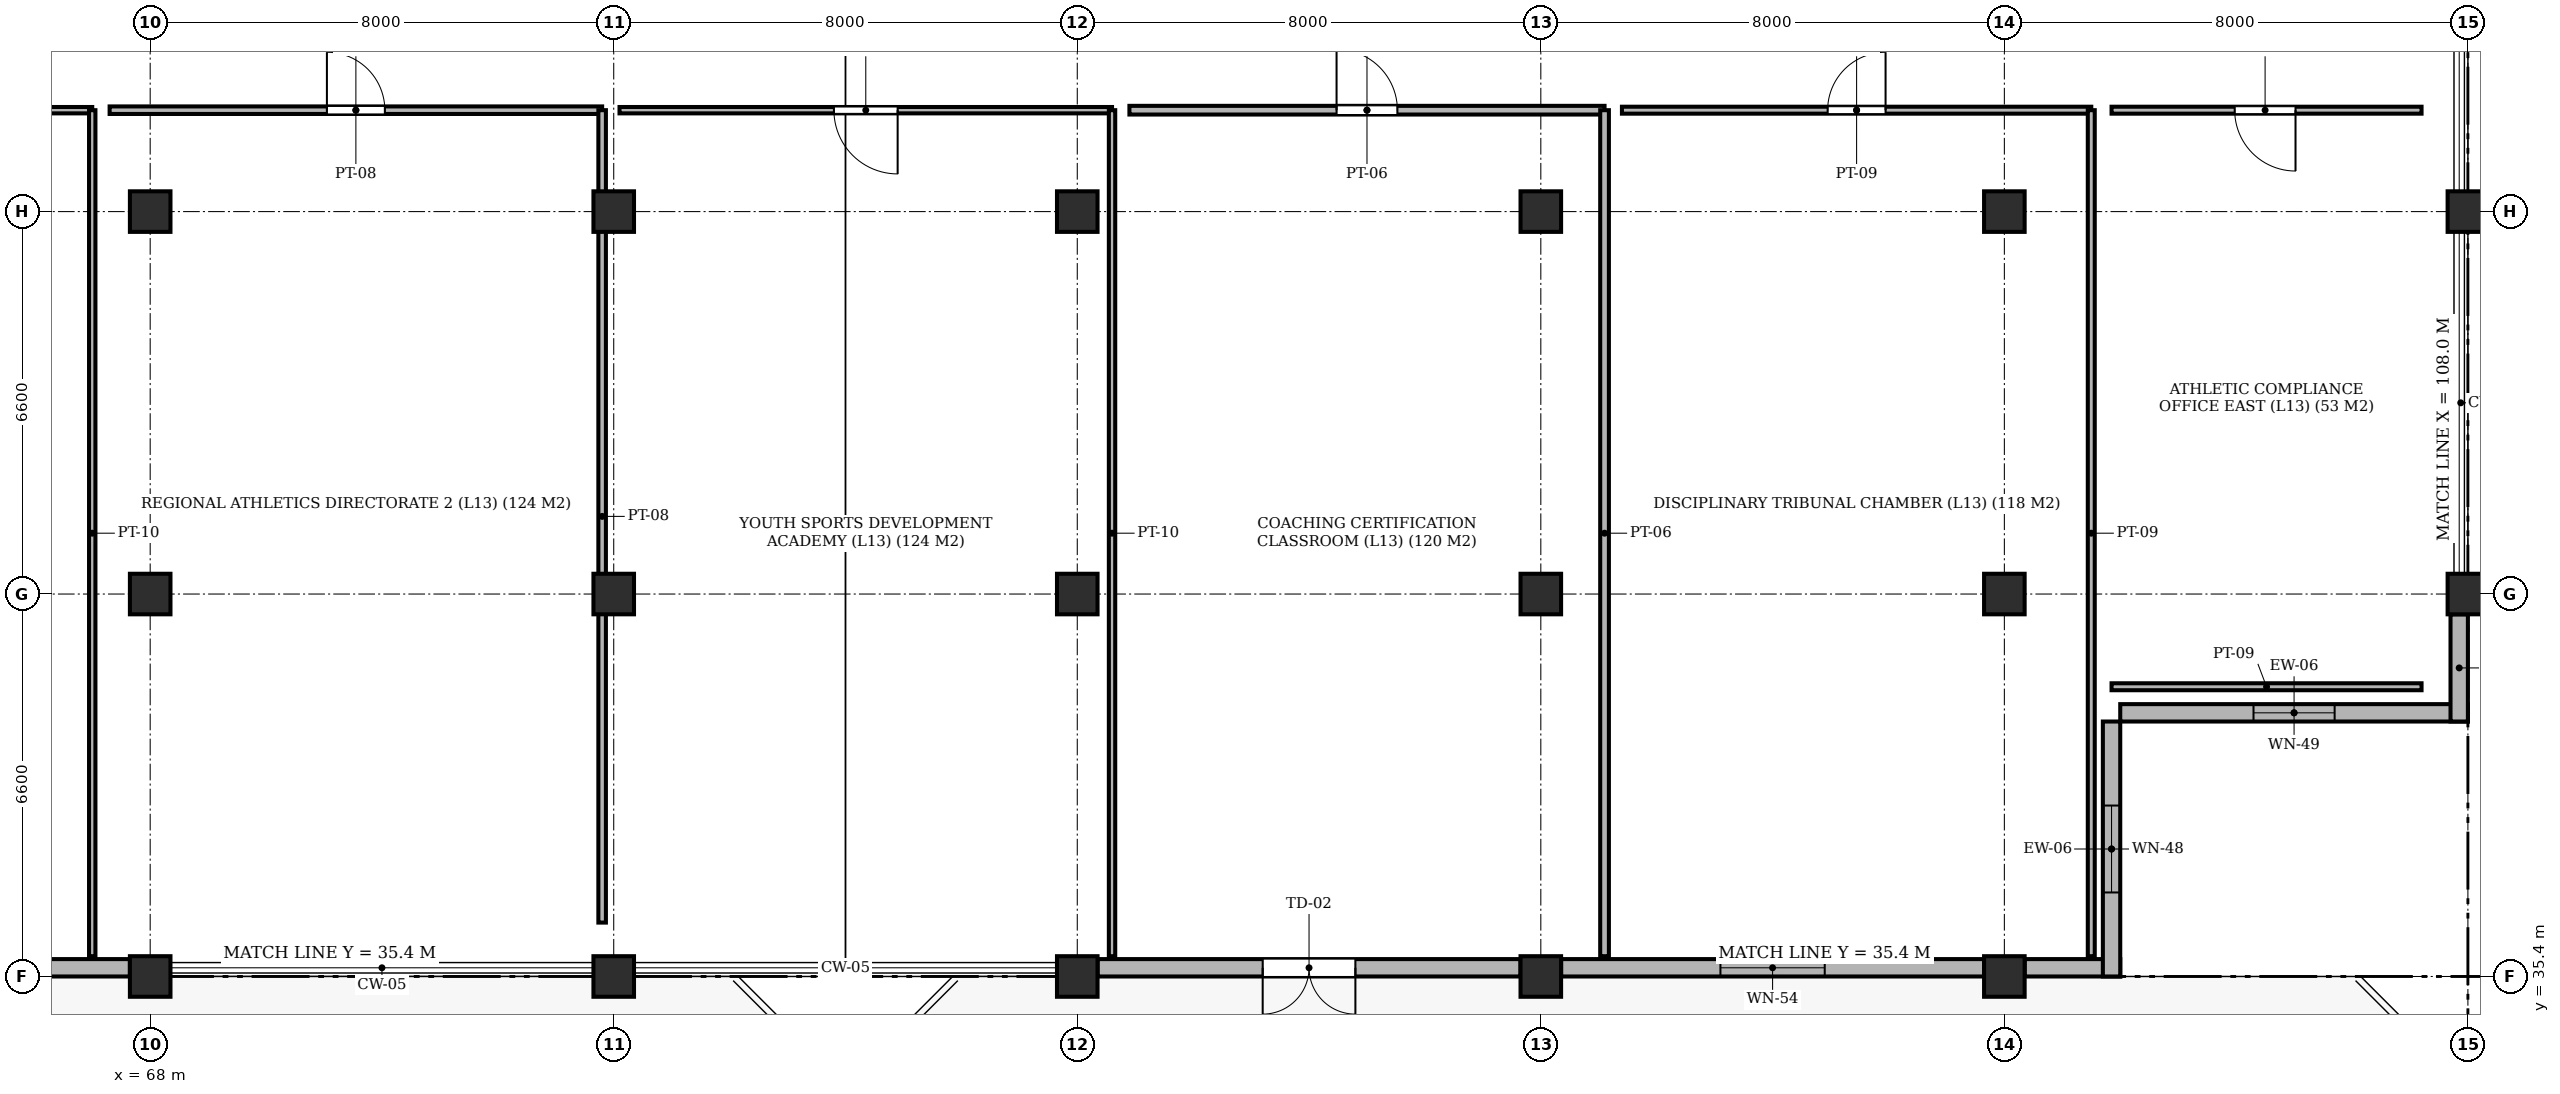
"""IFC4 building model, lengths in metres.
Left out: names, types, materials, properties, quantities, classifications, styles, units other than length and angle.
Written with IfcOpenShell. Run it as: python <this file> out.ifc"""

import sys

from ifc_helpers import new_model, si_unit, direction, frame, frame_2d, origin, origin_2d, place, context, subcontext, project, spatial, rectangle, extrude, element, fill, save


model = new_model("IFC4")
c1 = context("Model", 3, precision=1e-05, world=origin(), true_north=direction((0.0, 1.0)))
c2 = subcontext(c1, "Body", "Model", "MODEL_VIEW")
j1 = project(units=[si_unit("LENGTHUNIT", "METRE"), si_unit("PLANEANGLEUNIT", "RADIAN")], contexts=[c1])
p1 = place(None, origin())
s1 = spatial("IfcSite", under=j1, at=p1, CompositionType="ELEMENT")
p2 = place(p1, origin())
s2 = spatial("IfcBuilding", under=s1, at=p2, CompositionType="ELEMENT")
p3 = place(p2, frame((0.0, 0.0, 53.55)))
s3 = spatial("IfcBuildingStorey", under=s2, at=p3, CompositionType="ELEMENT", Elevation=53.55)
for number, where, z_axis, x_axis in (
    (1, (68.0, 35.4, -0.22), (0.0, 0.0, 1.0), (1.0, 0.0, 0.0)),
    (2, (68.0, 42.0, -0.22), (0.0, 0.0, 1.0), (1.0, 0.0, 0.0)),
    (3, (68.0, 48.6, -0.22), (0.0, 0.0, 1.0), (1.0, 0.0, 0.0)),
    (4, (76.0, 35.4, -0.22), (0.0, 0.0, 1.0), (1.0, 0.0, 0.0)),
    (5, (76.0, 42.0, -0.22), (0.0, 0.0, 1.0), (1.0, 0.0, 0.0)),
    (6, (76.0, 48.6, -0.22), (0.0, 0.0, 1.0), (1.0, 0.0, 0.0)),
    (7, (84.0, 35.4, -0.22), (0.0, 0.0, 1.0), (1.0, 0.0, 0.0)),
    (8, (84.0, 42.0, -0.22), (0.0, 0.0, 1.0), (1.0, 0.0, 0.0)),
    (9, (84.0, 48.6, -0.22), (0.0, 0.0, 1.0), (1.0, 0.0, 0.0)),
    (10, (92.0, 35.4, -0.22), (0.0, 0.0, 1.0), (1.0, 0.0, 0.0)),
    (11, (92.0, 42.0, -0.22), (0.0, 0.0, 1.0), (1.0, 0.0, 0.0)),
    (12, (92.0, 48.6, -0.22), (0.0, 0.0, 1.0), (1.0, 0.0, 0.0)),
    (13, (100.0, 35.4, -0.22), (0.0, 0.0, 1.0), (1.0, 0.0, 0.0)),
    (14, (100.0, 42.0, -0.22), (0.0, 0.0, 1.0), (1.0, 0.0, 0.0)),
    (15, (100.0, 48.6, -0.22), (0.0, 0.0, 1.0), (1.0, 0.0, 0.0)),
    (16, (108.0, 42.0, -0.22), (0.0, 0.0, 1.0), (1.0, 0.0, 0.0)),
    (17, (108.0, 48.6, -0.22), (0.0, 0.0, 1.0), (1.0, 0.0, 0.0)),
):
    element("IfcColumn", number, at=place(p3, frame(where, z_axis=z_axis, x_axis=x_axis)), inside=s3, PredefinedType="COLUMN", context=c2, shape_type="SweptSolid", body=[
        extrude(rectangle(XDim=0.7, YDim=0.7, at=origin_2d()), origin(), (0.0, 0.0, 1.0), 3.25),
    ])
p4 = place(p3, frame((60.35, 35.55, 0.0), z_axis=(0.0, 0.0, 1.0), x_axis=(1.0, 0.0, 0.0)))
e18 = element("IfcWall", 18, at=p4, inside=s3, PredefinedType="SOLIDWALL", context=c2, shape_type="SweptSolid", body=[
    extrude(rectangle(XDim=7.3, YDim=0.3, at=frame_2d((3.65, 0.0))), origin(), (0.0, 0.0, 1.0), 2.53),
])
p5 = place(p4, frame((2.85, 0.0, 0.0)))
e19 = element("IfcOpeningElement", 19, at=p5, cuts=e18, PredefinedType="OPENING", context=c2, shape_type="SweptSolid", body=[
    extrude(rectangle(XDim=1.6, YDim=2.2, at=frame_2d((0.8, 1.1))), frame((0.0, 0.162, 0.0), z_axis=(0.0, -1.0, 0.0), x_axis=(1.0, 0.0, 0.0)), (0.0, 0.0, 1.0), 0.324),
])
p6 = place(p3, frame((84.35, 35.55, 0.0), z_axis=(0.0, 0.0, 1.0), x_axis=(1.0, 0.0, 0.0)))
e20 = element("IfcWall", 20, at=p6, inside=s3, PredefinedType="SOLIDWALL", context=c2, shape_type="SweptSolid", body=[
    extrude(rectangle(XDim=7.3, YDim=0.3, at=frame_2d((3.65, 0.0))), origin(), (0.0, 0.0, 1.0), 2.53),
])
p7 = place(p6, frame((2.85, 0.0, 0.0)))
e21 = element("IfcOpeningElement", 21, at=p7, cuts=e20, PredefinedType="OPENING", context=c2, shape_type="SweptSolid", body=[
    extrude(rectangle(XDim=1.6, YDim=2.2, at=frame_2d((0.8, 1.1))), frame((0.0, 0.162, 0.0), z_axis=(0.0, -1.0, 0.0), x_axis=(1.0, 0.0, 0.0)), (0.0, 0.0, 1.0), 0.324),
])
p8 = place(p3, frame((92.35, 35.55, 0.0), z_axis=(0.0, 0.0, 1.0), x_axis=(1.0, 0.0, 0.0)))
e22 = element("IfcWall", 22, at=p8, inside=s3, PredefinedType="SOLIDWALL", context=c2, shape_type="SweptSolid", body=[
    extrude(rectangle(XDim=7.3, YDim=0.3, at=frame_2d((3.65, 0.0))), origin(), (0.0, 0.0, 1.0), 2.53),
])
p9 = place(p8, frame((2.75, 0.0, 0.62)))
e23 = element("IfcOpeningElement", 23, at=p9, cuts=e22, PredefinedType="OPENING", context=c2, shape_type="SweptSolid", body=[
    extrude(rectangle(XDim=1.8, YDim=1.81, at=frame_2d((0.9, 0.905))), frame((0.0, 0.162, 0.0), z_axis=(0.0, -1.0, 0.0), x_axis=(1.0, 0.0, 0.0)), (0.0, 0.0, 1.0), 0.324),
])
p10 = place(p3, frame((100.35, 35.55, 0.0), z_axis=(0.0, 0.0, 1.0), x_axis=(1.0, 0.0, 0.0)))
e24 = element("IfcWall", 24, at=p10, inside=s3, PredefinedType="SOLIDWALL", context=c2, shape_type="SweptSolid", body=[
    extrude(rectangle(XDim=1.65, YDim=0.3, at=frame_2d((0.825, 0.0))), origin(), (0.0, 0.0, 1.0), 2.53),
])
p11 = place(p3, frame((101.85, 35.4, 0.0), z_axis=(0.0, 0.0, 1.0), x_axis=(0.0, 1.0, 0.0)))
e25 = element("IfcWall", 25, at=p11, inside=s3, PredefinedType="SOLIDWALL", context=c2, shape_type="SweptSolid", body=[
    extrude(rectangle(XDim=4.4, YDim=0.3, at=frame_2d((2.2, 0.0))), origin(), (0.0, 0.0, 1.0), 2.53),
])
p12 = place(p11, frame((1.45, 0.0, 0.62)))
e26 = element("IfcOpeningElement", 26, at=p12, cuts=e25, PredefinedType="OPENING", context=c2, shape_type="SweptSolid", body=[
    extrude(rectangle(XDim=1.5, YDim=1.81, at=frame_2d((0.75, 0.905))), frame((0.0, 0.162, 0.0), z_axis=(0.0, -1.0, 0.0), x_axis=(1.0, 0.0, 0.0)), (0.0, 0.0, 1.0), 0.324),
])
p13 = place(p3, frame((102.0, 39.95, 0.0), z_axis=(0.0, 0.0, 1.0), x_axis=(1.0, 0.0, 0.0)))
e27 = element("IfcWall", 27, at=p13, inside=s3, PredefinedType="SOLIDWALL", context=c2, shape_type="SweptSolid", body=[
    extrude(rectangle(XDim=6.0, YDim=0.3, at=frame_2d((3.0, 0.0))), origin(), (0.0, 0.0, 1.0), 2.53),
])
p14 = place(p13, frame((2.3, 0.0, 0.62)))
e28 = element("IfcOpeningElement", 28, at=p14, cuts=e27, PredefinedType="OPENING", context=c2, shape_type="SweptSolid", body=[
    extrude(rectangle(XDim=1.4, YDim=1.81, at=frame_2d((0.7, 0.905))), frame((0.0, 0.162, 0.0), z_axis=(0.0, -1.0, 0.0), x_axis=(1.0, 0.0, 0.0)), (0.0, 0.0, 1.0), 0.324),
])
p15 = place(p3, frame((107.85, 39.8, 0.0), z_axis=(0.0, 0.0, 1.0), x_axis=(0.0, 1.0, 0.0)))
e29 = element("IfcWall", 29, at=p15, inside=s3, PredefinedType="SOLIDWALL", context=c2, shape_type="SweptSolid", body=[
    extrude(rectangle(XDim=1.85, YDim=0.3, at=frame_2d((0.925, 0.0))), origin(), (0.0, 0.0, 1.0), 2.53),
])
p16 = place(p3, frame((59.0, 50.35, 0.0), z_axis=(0.0, 0.0, 1.0), x_axis=(1.0, 0.0, 0.0)))
e30 = element("IfcWall", 30, at=p16, inside=s3, PredefinedType="PARTITIONING", context=c2, shape_type="SweptSolid", body=[
    extrude(rectangle(XDim=8.0, YDim=0.11, at=frame_2d((4.0, 0.0))), origin(), (0.0, 0.0, 1.0), 2.53),
])
p17 = place(p16, frame((3.475, 0.0, 0.0)))
e31 = element("IfcOpeningElement", 31, at=p17, cuts=e30, PredefinedType="OPENING", context=c2, shape_type="SweptSolid", body=[
    extrude(rectangle(XDim=1.05, YDim=2.15, at=frame_2d((0.525, 1.075))), frame((0.0, 0.067, 0.0), z_axis=(0.0, -1.0, 0.0), x_axis=(1.0, 0.0, 0.0)), (0.0, 0.0, 1.0), 0.134),
])
p18 = place(p3, frame((67.0, 35.75, 0.0), z_axis=(0.0, 0.0, 1.0), x_axis=(0.0, 1.0, 0.0)))
e32 = element("IfcWall", 32, at=p18, inside=s3, PredefinedType="PARTITIONING", context=c2, shape_type="SweptSolid", body=[
    extrude(rectangle(XDim=14.6, YDim=0.11, at=frame_2d((7.3, 0.0))), origin(), (0.0, 0.0, 1.0), 2.53),
])
p19 = place(p3, frame((67.3, 50.35, 0.0), z_axis=(0.0, 0.0, 1.0), x_axis=(1.0, 0.0, 0.0)))
e33 = element("IfcWall", 33, at=p19, inside=s3, PredefinedType="PARTITIONING", context=c2, shape_type="SweptSolid", body=[
    extrude(rectangle(XDim=8.5, YDim=0.13, at=frame_2d((4.25, 0.0))), origin(), (0.0, 0.0, 1.0), 2.53),
])
p20 = place(p19, frame((3.75, 0.0, 0.0)))
e34 = element("IfcOpeningElement", 34, at=p20, cuts=e33, PredefinedType="OPENING", context=c2, shape_type="SweptSolid", body=[
    extrude(rectangle(XDim=1.0, YDim=2.15, at=frame_2d((0.5, 1.075))), frame((0.0, 0.077, 0.0), z_axis=(0.0, -1.0, 0.0), x_axis=(1.0, 0.0, 0.0)), (0.0, 0.0, 1.0), 0.154),
])
p21 = place(p3, frame((75.8, 36.33, 0.0), z_axis=(0.0, 0.0, 1.0), x_axis=(0.0, 1.0, 0.0)))
e35 = element("IfcWall", 35, at=p21, inside=s3, PredefinedType="PARTITIONING", context=c2, shape_type="SweptSolid", body=[
    extrude(rectangle(XDim=14.02, YDim=0.13, at=frame_2d((7.01, 0.0))), origin(), (0.0, 0.0, 1.0), 2.53),
])
p22 = place(p3, frame((76.1, 50.35, 0.0), z_axis=(0.0, 0.0, 1.0), x_axis=(1.0, 0.0, 0.0)))
e36 = element("IfcWall", 36, at=p22, inside=s3, PredefinedType="PARTITIONING", context=c2, shape_type="SweptSolid", body=[
    extrude(rectangle(XDim=8.5, YDim=0.11, at=frame_2d((4.25, 0.0))), origin(), (0.0, 0.0, 1.0), 2.53),
])
p23 = place(p22, frame((3.7, 0.0, 0.0)))
e37 = element("IfcOpeningElement", 37, at=p23, cuts=e36, PredefinedType="OPENING", context=c2, shape_type="SweptSolid", body=[
    extrude(rectangle(XDim=1.1, YDim=2.15, at=frame_2d((0.55, 1.075))), frame((0.0, 0.067, 0.0), z_axis=(0.0, -1.0, 0.0), x_axis=(1.0, 0.0, 0.0)), (0.0, 0.0, 1.0), 0.134),
])
p24 = place(p3, frame((84.6, 35.75, 0.0), z_axis=(0.0, 0.0, 1.0), x_axis=(0.0, 1.0, 0.0)))
e38 = element("IfcWall", 38, at=p24, inside=s3, PredefinedType="PARTITIONING", context=c2, shape_type="SweptSolid", body=[
    extrude(rectangle(XDim=14.6, YDim=0.11, at=frame_2d((7.3, 0.0))), origin(), (0.0, 0.0, 1.0), 2.53),
])
p25 = place(p3, frame((84.9, 50.35, 0.0), z_axis=(0.0, 0.0, 1.0), x_axis=(1.0, 0.0, 0.0)))
e39 = element("IfcWall", 39, at=p25, inside=s3, PredefinedType="PARTITIONING", context=c2, shape_type="SweptSolid", body=[
    extrude(rectangle(XDim=8.2, YDim=0.15, at=frame_2d((4.1, 0.0))), origin(), (0.0, 0.0, 1.0), 2.53),
])
p26 = place(p25, frame((3.575, 0.0, 0.0)))
e40 = element("IfcOpeningElement", 40, at=p26, cuts=e39, PredefinedType="OPENING", context=c2, shape_type="SweptSolid", body=[
    extrude(rectangle(XDim=1.05, YDim=2.15, at=frame_2d((0.525, 1.075))), frame((0.0, 0.087, 0.0), z_axis=(0.0, -1.0, 0.0), x_axis=(1.0, 0.0, 0.0)), (0.0, 0.0, 1.0), 0.174),
])
p27 = place(p3, frame((93.1, 35.75, 0.0), z_axis=(0.0, 0.0, 1.0), x_axis=(0.0, 1.0, 0.0)))
e41 = element("IfcWall", 41, at=p27, inside=s3, PredefinedType="PARTITIONING", context=c2, shape_type="SweptSolid", body=[
    extrude(rectangle(XDim=14.6, YDim=0.15, at=frame_2d((7.3, 0.0))), origin(), (0.0, 0.0, 1.0), 2.53),
])
p28 = place(p3, frame((93.4, 50.35, 0.0), z_axis=(0.0, 0.0, 1.0), x_axis=(1.0, 0.0, 0.0)))
e42 = element("IfcWall", 42, at=p28, inside=s3, PredefinedType="PARTITIONING", context=c2, shape_type="SweptSolid", body=[
    extrude(rectangle(XDim=8.1, YDim=0.12, at=frame_2d((4.05, 0.0))), origin(), (0.0, 0.0, 1.0), 2.53),
])
p29 = place(p28, frame((3.55, 0.0, 0.0)))
e43 = element("IfcOpeningElement", 43, at=p29, cuts=e42, PredefinedType="OPENING", context=c2, shape_type="SweptSolid", body=[
    extrude(rectangle(XDim=1.0, YDim=2.15, at=frame_2d((0.5, 1.075))), frame((0.0, 0.072, 0.0), z_axis=(0.0, -1.0, 0.0), x_axis=(1.0, 0.0, 0.0)), (0.0, 0.0, 1.0), 0.144),
])
p30 = place(p3, frame((101.5, 35.75, 0.0), z_axis=(0.0, 0.0, 1.0), x_axis=(0.0, 1.0, 0.0)))
e44 = element("IfcWall", 44, at=p30, inside=s3, PredefinedType="PARTITIONING", context=c2, shape_type="SweptSolid", body=[
    extrude(rectangle(XDim=14.6, YDim=0.12, at=frame_2d((7.3, 0.0))), origin(), (0.0, 0.0, 1.0), 2.53),
])
p31 = place(p3, frame((101.85, 40.4, 0.0), z_axis=(0.0, 0.0, 1.0), x_axis=(1.0, 0.0, 0.0)))
e45 = element("IfcWall", 45, at=p31, inside=s3, PredefinedType="PARTITIONING", context=c2, shape_type="SweptSolid", body=[
    extrude(rectangle(XDim=5.35, YDim=0.12, at=frame_2d((2.675, 0.0))), origin(), (0.0, 0.0, 1.0), 2.53),
])
p32 = place(p3, frame((101.85, 50.35, 0.0), z_axis=(0.0, 0.0, 1.0), x_axis=(1.0, 0.0, 0.0)))
e46 = element("IfcWall", 46, at=p32, inside=s3, PredefinedType="PARTITIONING", context=c2, shape_type="SweptSolid", body=[
    extrude(rectangle(XDim=5.35, YDim=0.12, at=frame_2d((2.675, 0.0))), origin(), (0.0, 0.0, 1.0), 2.53),
])
p33 = place(p32, frame((2.125, 0.0, 0.0)))
e47 = element("IfcOpeningElement", 47, at=p33, cuts=e46, PredefinedType="OPENING", context=c2, shape_type="SweptSolid", body=[
    extrude(rectangle(XDim=1.05, YDim=2.15, at=frame_2d((0.525, 1.075))), frame((0.0, 0.072, 0.0), z_axis=(0.0, -1.0, 0.0), x_axis=(1.0, 0.0, 0.0)), (0.0, 0.0, 1.0), 0.144),
])
p34 = place(p7, frame((1.6, 0.0, 0.0), z_axis=(0.0, 0.0, 1.0), x_axis=(-1.0, 0.0, 0.0)))
e48 = element("IfcDoor", 48, at=p34, inside=s3, OperationType="DOUBLE_DOOR_SINGLE_SWING", PredefinedType="DOOR", context=c2, shape_type="SweptSolid", body=[
    extrude(rectangle(XDim=1.6, YDim=2.2, at=frame_2d((0.8, 1.1))), frame((0.0, 0.025, 0.0), z_axis=(0.0, -1.0, 0.0), x_axis=(1.0, 0.0, 0.0)), (0.0, 0.0, 1.0), 0.05),
])
fill(e21, e48)
p35 = place(p9, origin())
e49 = element("IfcWindow", 49, at=p35, inside=s3, PartitioningType="SINGLE_PANEL", PredefinedType="WINDOW", context=c2, shape_type="SweptSolid", body=[
    extrude(rectangle(XDim=1.8, YDim=1.81, at=frame_2d((0.9, 0.905))), frame((0.0, 0.03, 0.0), z_axis=(0.0, -1.0, 0.0), x_axis=(1.0, 0.0, 0.0)), (0.0, 0.0, 1.0), 0.06),
])
fill(e23, e49)
p36 = place(p12, origin())
e50 = element("IfcWindow", 50, at=p36, inside=s3, PartitioningType="SINGLE_PANEL", PredefinedType="WINDOW", context=c2, shape_type="SweptSolid", body=[
    extrude(rectangle(XDim=1.5, YDim=1.81, at=frame_2d((0.75, 0.905))), frame((0.0, 0.03, 0.0), z_axis=(0.0, -1.0, 0.0), x_axis=(1.0, 0.0, 0.0)), (0.0, 0.0, 1.0), 0.06),
])
fill(e26, e50)
p37 = place(p14, origin())
e51 = element("IfcWindow", 51, at=p37, inside=s3, PartitioningType="SINGLE_PANEL", PredefinedType="WINDOW", context=c2, shape_type="SweptSolid", body=[
    extrude(rectangle(XDim=1.4, YDim=1.81, at=frame_2d((0.7, 0.905))), frame((0.0, 0.03, 0.0), z_axis=(0.0, -1.0, 0.0), x_axis=(1.0, 0.0, 0.0)), (0.0, 0.0, 1.0), 0.06),
])
fill(e28, e51)
p38 = place(p20, origin())
e52 = element("IfcDoor", 52, at=p38, inside=s3, OperationType="SINGLE_SWING_LEFT", PredefinedType="DOOR", context=c2, shape_type="SweptSolid", body=[
    extrude(rectangle(XDim=1.0, YDim=2.15, at=frame_2d((0.5, 1.075))), frame((0.0, 0.025, 0.0), z_axis=(0.0, -1.0, 0.0), x_axis=(1.0, 0.0, 0.0)), (0.0, 0.0, 1.0), 0.05),
])
fill(e34, e52)
p39 = place(p23, frame((1.1, 0.0, 0.0), z_axis=(0.0, 0.0, 1.0), x_axis=(-1.0, 0.0, 0.0)))
e53 = element("IfcDoor", 53, at=p39, inside=s3, OperationType="SINGLE_SWING_RIGHT", PredefinedType="DOOR", context=c2, shape_type="SweptSolid", body=[
    extrude(rectangle(XDim=1.1, YDim=2.15, at=frame_2d((0.55, 1.075))), frame((0.0, 0.025, 0.0), z_axis=(0.0, -1.0, 0.0), x_axis=(1.0, 0.0, 0.0)), (0.0, 0.0, 1.0), 0.05),
])
fill(e37, e53)
p40 = place(p26, origin())
e54 = element("IfcDoor", 54, at=p40, inside=s3, OperationType="SINGLE_SWING_LEFT", PredefinedType="DOOR", context=c2, shape_type="SweptSolid", body=[
    extrude(rectangle(XDim=1.05, YDim=2.15, at=frame_2d((0.525, 1.075))), frame((0.0, 0.025, 0.0), z_axis=(0.0, -1.0, 0.0), x_axis=(1.0, 0.0, 0.0)), (0.0, 0.0, 1.0), 0.05),
])
fill(e40, e54)
p41 = place(p29, origin())
e55 = element("IfcDoor", 55, at=p41, inside=s3, OperationType="SINGLE_SWING_RIGHT", PredefinedType="DOOR", context=c2, shape_type="SweptSolid", body=[
    extrude(rectangle(XDim=1.0, YDim=2.15, at=frame_2d((0.5, 1.075))), frame((0.0, 0.025, 0.0), z_axis=(0.0, -1.0, 0.0), x_axis=(1.0, 0.0, 0.0)), (0.0, 0.0, 1.0), 0.05),
])
fill(e43, e55)
p42 = place(p33, frame((1.05, 0.0, 0.0), z_axis=(0.0, 0.0, 1.0), x_axis=(-1.0, 0.0, 0.0)))
e56 = element("IfcDoor", 56, at=p42, inside=s3, OperationType="SINGLE_SWING_RIGHT", PredefinedType="DOOR", context=c2, shape_type="SweptSolid", body=[
    extrude(rectangle(XDim=1.05, YDim=2.15, at=frame_2d((0.525, 1.075))), frame((0.0, 0.025, 0.0), z_axis=(0.0, -1.0, 0.0), x_axis=(1.0, 0.0, 0.0)), (0.0, 0.0, 1.0), 0.05),
])
fill(e47, e56)
save(model, sys.argv[1])
